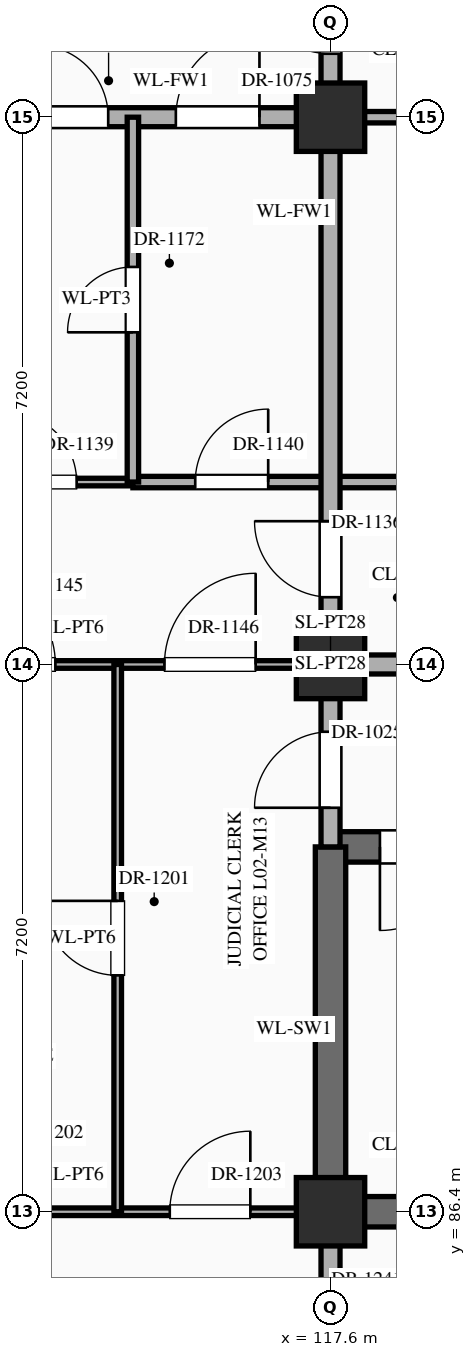
"""IFC4 building model, lengths in metres.
Left out: names, types, materials, properties, quantities, classifications, styles, units other than length and angle.
Written with IfcOpenShell. Run it as: python <this file> out.ifc"""

import sys

from ifc_helpers import new_model, si_unit, direction, frame, frame_2d, origin, origin_2d, place, context, subcontext, project, spatial, rectangle, extrude, element, fill, save


model = new_model("IFC4")
c1 = context("Model", 3, precision=1e-05, world=origin(), true_north=direction((0.0, 1.0)))
c2 = subcontext(c1, "Body", "Model", "MODEL_VIEW")
j1 = project(units=[si_unit("LENGTHUNIT", "METRE"), si_unit("PLANEANGLEUNIT", "RADIAN")], contexts=[c1])
p1 = place(None, origin())
s1 = spatial("IfcSite", under=j1, at=p1, CompositionType="ELEMENT")
p2 = place(p1, origin())
s2 = spatial("IfcBuilding", under=s1, at=p2, CompositionType="ELEMENT")
p3 = place(p2, frame((0.0, 0.0, 5.4)))
s3 = spatial("IfcBuildingStorey", under=s2, at=p3, CompositionType="ELEMENT", Elevation=5.4)
for number, where, z_axis, x_axis in (
    (1, (117.6, 86.4, 0.0), (0.0, 0.0, 1.0), (1.0, 0.0, 0.0)),
    (2, (117.6, 93.6, 0.0), (0.0, 0.0, 1.0), (1.0, 0.0, 0.0)),
    (3, (117.6, 100.8, 0.0), (0.0, 0.0, 1.0), (1.0, 0.0, 0.0)),
):
    element("IfcColumn", number, at=place(p3, frame(where, z_axis=z_axis, x_axis=x_axis)), inside=s3, PredefinedType="COLUMN", context=c2, shape_type="SweptSolid", body=[
        extrude(rectangle(XDim=0.9, YDim=0.9, at=origin_2d()), origin(), (0.0, 0.0, 1.0), 5.4),
    ])
p4 = place(p3, frame((109.2, 86.4, 0.0), z_axis=(0.0, 0.0, 1.0), x_axis=(1.0, 0.0, 0.0)))
e4 = element("IfcWall", 4, at=p4, inside=s3, PredefinedType="STANDARD", context=c2, shape_type="SweptSolid", body=[
    extrude(rectangle(XDim=8.4, YDim=0.1, at=frame_2d((4.2, 0.0))), origin(), (0.0, 0.0, 1.0), 4.27),
])
p5 = place(p4, frame((1.115, 0.0, 0.0)))
e5 = element("IfcOpeningElement", 5, at=p5, cuts=e4, PredefinedType="OPENING", context=c2, shape_type="SweptSolid", body=[
    extrude(rectangle(XDim=0.94, YDim=2.3, at=frame_2d((0.47, 1.15))), frame((0.0, 0.062, 0.0), z_axis=(0.0, -1.0, 0.0), x_axis=(1.0, 0.0, 0.0)), (0.0, 0.0, 1.0), 0.124),
])
p6 = place(p4, frame((3.69, 0.0, 0.0)))
e6 = element("IfcOpeningElement", 6, at=p6, cuts=e4, PredefinedType="OPENING", context=c2, shape_type="SweptSolid", body=[
    extrude(rectangle(XDim=1.02, YDim=2.4, at=frame_2d((0.51, 1.2))), frame((0.0, 0.062, 0.0), z_axis=(0.0, -1.0, 0.0), x_axis=(1.0, 0.0, 0.0)), (0.0, 0.0, 1.0), 0.124),
])
p7 = place(p4, frame((6.285, 0.0, 0.0)))
e7 = element("IfcOpeningElement", 7, at=p7, cuts=e4, PredefinedType="OPENING", context=c2, shape_type="SweptSolid", body=[
    extrude(rectangle(XDim=1.06, YDim=2.4, at=frame_2d((0.53, 1.2))), frame((0.0, 0.062, 0.0), z_axis=(0.0, -1.0, 0.0), x_axis=(1.0, 0.0, 0.0)), (0.0, 0.0, 1.0), 0.124),
])
p8 = place(p3, frame((117.6, 86.4, 0.0), z_axis=(0.0, 0.0, 1.0), x_axis=(1.0, 0.0, 0.0)))
e8 = element("IfcWall", 8, at=p8, inside=s3, PredefinedType="SHEAR", context=c2, shape_type="SweptSolid", body=[
    extrude(rectangle(XDim=8.4, YDim=0.4, at=frame_2d((4.2, 0.0))), origin(), (0.0, 0.0, 1.0), 5.12),
])
p9 = place(p3, frame((117.6, 91.2, 0.0), z_axis=(0.0, 0.0, 1.0), x_axis=(1.0, 0.0, 0.0)))
e9 = element("IfcWall", 9, at=p9, inside=s3, PredefinedType="SHEAR", context=c2, shape_type="SweptSolid", body=[
    extrude(rectangle(XDim=8.4, YDim=0.4, at=frame_2d((4.2, 0.0))), origin(), (0.0, 0.0, 1.0), 5.12),
])
p10 = place(p9, frame((0.65, 0.0, 0.0)))
e10 = element("IfcOpeningElement", 10, at=p10, cuts=e9, PredefinedType="OPENING", context=c2, shape_type="SweptSolid", body=[
    extrude(rectangle(XDim=1.1, YDim=2.2, at=frame_2d((0.55, 1.1))), frame((0.0, 0.212, 0.0), z_axis=(0.0, -1.0, 0.0), x_axis=(1.0, 0.0, 0.0)), (0.0, 0.0, 1.0), 0.424),
])
p11 = place(p3, frame((109.2, 93.6, 0.0), z_axis=(0.0, 0.0, 1.0), x_axis=(1.0, 0.0, 0.0)))
e11 = element("IfcWall", 11, at=p11, inside=s3, PredefinedType="STANDARD", context=c2, shape_type="SweptSolid", body=[
    extrude(rectangle(XDim=8.4, YDim=0.1, at=frame_2d((4.2, 0.0))), origin(), (0.0, 0.0, 1.0), 4.27),
])
p12 = place(p11, frame((1.025, 0.0, 0.0)))
e12 = element("IfcOpeningElement", 12, at=p12, cuts=e11, PredefinedType="OPENING", context=c2, shape_type="SweptSolid", body=[
    extrude(rectangle(XDim=1.12, YDim=2.25, at=frame_2d((0.56, 1.125))), frame((0.0, 0.062, 0.0), z_axis=(0.0, -1.0, 0.0), x_axis=(1.0, 0.0, 0.0)), (0.0, 0.0, 1.0), 0.124),
])
p13 = place(p11, frame((3.62, 0.0, 0.0)))
e13 = element("IfcOpeningElement", 13, at=p13, cuts=e11, PredefinedType="OPENING", context=c2, shape_type="SweptSolid", body=[
    extrude(rectangle(XDim=1.16, YDim=2.3, at=frame_2d((0.58, 1.15))), frame((0.0, 0.062, 0.0), z_axis=(0.0, -1.0, 0.0), x_axis=(1.0, 0.0, 0.0)), (0.0, 0.0, 1.0), 0.124),
])
p14 = place(p11, frame((6.215, 0.0, 0.0)))
e14 = element("IfcOpeningElement", 14, at=p14, cuts=e11, PredefinedType="OPENING", context=c2, shape_type="SweptSolid", body=[
    extrude(rectangle(XDim=1.2, YDim=2.35, at=frame_2d((0.6, 1.175))), frame((0.0, 0.062, 0.0), z_axis=(0.0, -1.0, 0.0), x_axis=(1.0, 0.0, 0.0)), (0.0, 0.0, 1.0), 0.124),
])
p15 = place(p3, frame((117.6, 93.6, 0.0), z_axis=(0.0, 0.0, 1.0), x_axis=(1.0, 0.0, 0.0)))
e15 = element("IfcWall", 15, at=p15, inside=s3, PredefinedType="STANDARD", context=c2, shape_type="SweptSolid", body=[
    extrude(rectangle(XDim=8.4, YDim=0.25, at=frame_2d((4.2, 0.0))), origin(), (0.0, 0.0, 1.0), 4.27),
])
p16 = place(p15, frame((3.462, 0.0, 0.0)))
e16 = element("IfcOpeningElement", 16, at=p16, cuts=e15, PredefinedType="OPENING", context=c2, shape_type="SweptSolid", body=[
    extrude(rectangle(XDim=1.5, YDim=2.25, at=frame_2d((0.75, 1.125))), frame((0.0, 0.137, 0.0), z_axis=(0.0, -1.0, 0.0), x_axis=(1.0, 0.0, 0.0)), (0.0, 0.0, 1.0), 0.274),
])
p17 = place(p3, frame((109.2, 96.0, 0.0), z_axis=(0.0, 0.0, 1.0), x_axis=(1.0, 0.0, 0.0)))
e17 = element("IfcWall", 17, at=p17, inside=s3, PredefinedType="STANDARD", context=c2, shape_type="SweptSolid", body=[
    extrude(rectangle(XDim=5.8, YDim=0.1, at=frame_2d((2.9, 0.0))), origin(), (0.0, 0.0, 1.0), 5.12),
])
p18 = place(p17, frame((1.27, 0.0, 0.0)))
e18 = element("IfcOpeningElement", 18, at=p18, cuts=e17, PredefinedType="OPENING", context=c2, shape_type="SweptSolid", body=[
    extrude(rectangle(XDim=0.86, YDim=2.1, at=frame_2d((0.43, 1.05))), frame((0.0, 0.062, 0.0), z_axis=(0.0, -1.0, 0.0), x_axis=(1.0, 0.0, 0.0)), (0.0, 0.0, 1.0), 0.124),
])
p19 = place(p17, frame((4.14, 0.0, 0.0)))
e19 = element("IfcOpeningElement", 19, at=p19, cuts=e17, PredefinedType="OPENING", context=c2, shape_type="SweptSolid", body=[
    extrude(rectangle(XDim=0.92, YDim=2.15, at=frame_2d((0.46, 1.075))), frame((0.0, 0.062, 0.0), z_axis=(0.0, -1.0, 0.0), x_axis=(1.0, 0.0, 0.0)), (0.0, 0.0, 1.0), 0.124),
])
p20 = place(p3, frame((115.0, 96.0, 0.0), z_axis=(0.0, 0.0, 1.0), x_axis=(1.0, 0.0, 0.0)))
e20 = element("IfcWall", 20, at=p20, inside=s3, PredefinedType="STANDARD", context=c2, shape_type="SweptSolid", body=[
    extrude(rectangle(XDim=19.4, YDim=0.15, at=frame_2d((9.7, 0.0))), origin(), (0.0, 0.0, 1.0), 5.12),
])
p21 = place(p20, frame((0.82, 0.0, 0.0)))
e21 = element("IfcOpeningElement", 21, at=p21, cuts=e20, PredefinedType="OPENING", context=c2, shape_type="SweptSolid", body=[
    extrude(rectangle(XDim=0.96, YDim=2.2, at=frame_2d((0.48, 1.1))), frame((0.0, 0.087, 0.0), z_axis=(0.0, -1.0, 0.0), x_axis=(1.0, 0.0, 0.0)), (0.0, 0.0, 1.0), 0.174),
])
p22 = place(p20, frame((6.18, 0.0, 0.0)))
e22 = element("IfcOpeningElement", 22, at=p22, cuts=e20, PredefinedType="OPENING", context=c2, shape_type="SweptSolid", body=[
    extrude(rectangle(XDim=1.24, YDim=2.3, at=frame_2d((0.62, 1.15))), frame((0.0, 0.087, 0.0), z_axis=(0.0, -1.0, 0.0), x_axis=(1.0, 0.0, 0.0)), (0.0, 0.0, 1.0), 0.174),
])
p23 = place(p20, frame((14.56, 0.0, 0.0)))
e23 = element("IfcOpeningElement", 23, at=p23, cuts=e20, PredefinedType="OPENING", context=c2, shape_type="SweptSolid", body=[
    extrude(rectangle(XDim=1.28, YDim=2.35, at=frame_2d((0.64, 1.175))), frame((0.0, 0.087, 0.0), z_axis=(0.0, -1.0, 0.0), x_axis=(1.0, 0.0, 0.0)), (0.0, 0.0, 1.0), 0.174),
])
p24 = place(p3, frame((113.4, 100.8, 0.0), z_axis=(0.0, 0.0, 1.0), x_axis=(1.0, 0.0, 0.0)))
e24 = element("IfcWall", 24, at=p24, inside=s3, PredefinedType="STANDARD", context=c2, shape_type="SweptSolid", body=[
    extrude(rectangle(XDim=4.2, YDim=0.25, at=frame_2d((2.1, 0.0))), origin(), (0.0, 0.0, 1.0), 4.27),
])
p25 = place(p24, frame((0.325, 0.0, 0.0)))
e25 = element("IfcOpeningElement", 25, at=p25, cuts=e24, PredefinedType="OPENING", context=c2, shape_type="SweptSolid", body=[
    extrude(rectangle(XDim=0.95, YDim=2.15, at=frame_2d((0.475, 1.075))), frame((0.0, 0.137, 0.0), z_axis=(0.0, -1.0, 0.0), x_axis=(1.0, 0.0, 0.0)), (0.0, 0.0, 1.0), 0.274),
])
p26 = place(p24, frame((2.165, 0.0, 0.0)))
e26 = element("IfcOpeningElement", 26, at=p26, cuts=e24, PredefinedType="OPENING", context=c2, shape_type="SweptSolid", body=[
    extrude(rectangle(XDim=1.1, YDim=2.2, at=frame_2d((0.55, 1.1))), frame((0.0, 0.137, 0.0), z_axis=(0.0, -1.0, 0.0), x_axis=(1.0, 0.0, 0.0)), (0.0, 0.0, 1.0), 0.274),
])
p27 = place(p3, frame((117.6, 100.8, 0.0), z_axis=(0.0, 0.0, 1.0), x_axis=(1.0, 0.0, 0.0)))
e27 = element("IfcWall", 27, at=p27, inside=s3, PredefinedType="STANDARD", context=c2, shape_type="SweptSolid", body=[
    extrude(rectangle(XDim=4.2, YDim=0.15, at=frame_2d((2.1, 0.0))), origin(), (0.0, 0.0, 1.0), 4.27),
])
p28 = place(p27, frame((1.805, 0.0, 0.0)))
e28 = element("IfcOpeningElement", 28, at=p28, cuts=e27, PredefinedType="OPENING", context=c2, shape_type="SweptSolid", body=[
    extrude(rectangle(XDim=0.96, YDim=2.2, at=frame_2d((0.48, 1.1))), frame((0.0, 0.087, 0.0), z_axis=(0.0, -1.0, 0.0), x_axis=(1.0, 0.0, 0.0)), (0.0, 0.0, 1.0), 0.174),
])
p29 = place(p3, frame((114.8, 86.4, 0.0), z_axis=(0.0, 0.0, 1.0), x_axis=(0.0, 1.0, 0.0)))
e29 = element("IfcWall", 29, at=p29, inside=s3, PredefinedType="STANDARD", context=c2, shape_type="SweptSolid", body=[
    extrude(rectangle(XDim=7.2, YDim=0.1, at=frame_2d((3.6, 0.0))), origin(), (0.0, 0.0, 1.0), 5.12),
])
p30 = place(p29, frame((3.11, 0.0, 0.0)))
e30 = element("IfcOpeningElement", 30, at=p30, cuts=e29, PredefinedType="OPENING", context=c2, shape_type="SweptSolid", body=[
    extrude(rectangle(XDim=0.98, YDim=2.35, at=frame_2d((0.49, 1.175))), frame((0.0, 0.062, 0.0), z_axis=(0.0, -1.0, 0.0), x_axis=(1.0, 0.0, 0.0)), (0.0, 0.0, 1.0), 0.124),
])
p31 = place(p3, frame((115.0, 96.0, 0.0), z_axis=(0.0, 0.0, 1.0), x_axis=(0.0, 1.0, 0.0)))
e31 = element("IfcWall", 31, at=p31, inside=s3, PredefinedType="STANDARD", context=c2, shape_type="SweptSolid", body=[
    extrude(rectangle(XDim=4.8, YDim=0.15, at=frame_2d((2.4, 0.0))), origin(), (0.0, 0.0, 1.0), 5.12),
])
p32 = place(p31, frame((1.97, 0.0, 0.0)))
e32 = element("IfcOpeningElement", 32, at=p32, cuts=e31, PredefinedType="OPENING", context=c2, shape_type="SweptSolid", body=[
    extrude(rectangle(XDim=0.86, YDim=2.1, at=frame_2d((0.43, 1.05))), frame((0.0, 0.087, 0.0), z_axis=(0.0, -1.0, 0.0), x_axis=(1.0, 0.0, 0.0)), (0.0, 0.0, 1.0), 0.174),
])
p33 = place(p3, frame((117.6, 79.24, 0.0), z_axis=(0.0, 0.0, 1.0), x_axis=(0.0, 1.0, 0.0)))
e33 = element("IfcWall", 33, at=p33, inside=s3, PredefinedType="STANDARD", context=c2, shape_type="SweptSolid", body=[
    extrude(rectangle(XDim=7.16, YDim=0.25, at=frame_2d((3.58, 0.0))), origin(), (0.0, 0.0, 1.0), 4.37),
])
p34 = place(p33, frame((5.275, 0.0, 0.0)))
e34 = element("IfcOpeningElement", 34, at=p34, cuts=e33, PredefinedType="OPENING", context=c2, shape_type="SweptSolid", body=[
    extrude(rectangle(XDim=1.0, YDim=2.2, at=frame_2d((0.5, 1.1))), frame((0.0, 0.137, 0.0), z_axis=(0.0, -1.0, 0.0), x_axis=(1.0, 0.0, 0.0)), (0.0, 0.0, 1.0), 0.274),
])
p35 = place(p3, frame((117.6, 86.4, 0.0), z_axis=(0.0, 0.0, 1.0), x_axis=(0.0, 1.0, 0.0)))
e35 = element("IfcWall", 35, at=p35, inside=s3, PredefinedType="SHEAR", context=c2, shape_type="SweptSolid", body=[
    extrude(rectangle(XDim=4.8, YDim=0.4, at=frame_2d((2.4, 0.0))), origin(), (0.0, 0.0, 1.0), 5.12),
])
p36 = place(p3, frame((117.6, 91.2, 0.0), z_axis=(0.0, 0.0, 1.0), x_axis=(0.0, 1.0, 0.0)))
e36 = element("IfcWall", 36, at=p36, inside=s3, PredefinedType="STANDARD", context=c2, shape_type="SweptSolid", body=[
    extrude(rectangle(XDim=13.2, YDim=0.25, at=frame_2d((6.6, 0.0))), origin(), (0.0, 0.0, 1.0), 4.37),
])
p37 = place(p36, frame((0.515, 0.0, 0.0)))
e37 = element("IfcOpeningElement", 37, at=p37, cuts=e36, PredefinedType="OPENING", context=c2, shape_type="SweptSolid", body=[
    extrude(rectangle(XDim=1.0, YDim=2.2, at=frame_2d((0.5, 1.1))), frame((0.0, 0.137, 0.0), z_axis=(0.0, -1.0, 0.0), x_axis=(1.0, 0.0, 0.0)), (0.0, 0.0, 1.0), 0.274),
])
p38 = place(p36, frame((10.435, 0.0, 0.0)))
e38 = element("IfcOpeningElement", 38, at=p38, cuts=e36, PredefinedType="OPENING", context=c2, shape_type="SweptSolid", body=[
    extrude(rectangle(XDim=1.1, YDim=2.2, at=frame_2d((0.55, 1.1))), frame((0.0, 0.137, 0.0), z_axis=(0.0, -1.0, 0.0), x_axis=(1.0, 0.0, 0.0)), (0.0, 0.0, 1.0), 0.274),
])
p39 = place(p36, frame((3.285, 0.0, 0.0)))
e39 = element("IfcOpeningElement", 39, at=p39, cuts=e36, PredefinedType="OPENING", context=c2, shape_type="SweptSolid", body=[
    extrude(rectangle(XDim=1.0, YDim=2.2, at=frame_2d((0.5, 1.1))), frame((0.0, 0.137, 0.0), z_axis=(0.0, -1.0, 0.0), x_axis=(1.0, 0.0, 0.0)), (0.0, 0.0, 1.0), 0.274),
])
p40 = place(p10, frame((1.1, 0.0, 0.0), z_axis=(0.0, 0.0, 1.0), x_axis=(-1.0, 0.0, 0.0)))
e40 = element("IfcDoor", 40, at=p40, inside=s3, OperationType="SINGLE_SWING_RIGHT", PredefinedType="DOOR", context=c2, shape_type="SweptSolid", body=[
    extrude(rectangle(XDim=1.1, YDim=2.2, at=frame_2d((0.55, 1.1))), frame((0.0, 0.025, 0.0), z_axis=(0.0, -1.0, 0.0), x_axis=(1.0, 0.0, 0.0)), (0.0, 0.0, 1.0), 0.05),
])
fill(e10, e40)
p41 = place(p37, origin())
e41 = element("IfcDoor", 41, at=p41, inside=s3, OperationType="SINGLE_SWING_LEFT", PredefinedType="DOOR", context=c2, shape_type="SweptSolid", body=[
    extrude(rectangle(XDim=1.0, YDim=2.2, at=frame_2d((0.5, 1.1))), frame((0.0, 0.025, 0.0), z_axis=(0.0, -1.0, 0.0), x_axis=(1.0, 0.0, 0.0)), (0.0, 0.0, 1.0), 0.05),
])
fill(e37, e41)
p42 = place(p38, origin())
e42 = element("IfcDoor", 42, at=p42, inside=s3, OperationType="SINGLE_SWING_RIGHT", PredefinedType="DOOR", context=c2, shape_type="SweptSolid", body=[
    extrude(rectangle(XDim=1.1, YDim=2.2, at=frame_2d((0.55, 1.1))), frame((0.0, 0.025, 0.0), z_axis=(0.0, -1.0, 0.0), x_axis=(1.0, 0.0, 0.0)), (0.0, 0.0, 1.0), 0.05),
])
fill(e38, e42)
p43 = place(p25, origin())
e43 = element("IfcDoor", 43, at=p43, inside=s3, OperationType="SINGLE_SWING_LEFT", PredefinedType="DOOR", context=c2, shape_type="SweptSolid", body=[
    extrude(rectangle(XDim=0.95, YDim=2.15, at=frame_2d((0.475, 1.075))), frame((0.0, 0.025, 0.0), z_axis=(0.0, -1.0, 0.0), x_axis=(1.0, 0.0, 0.0)), (0.0, 0.0, 1.0), 0.05),
])
fill(e25, e43)
p44 = place(p26, origin())
e44 = element("IfcDoor", 44, at=p44, inside=s3, OperationType="SINGLE_SWING_RIGHT", PredefinedType="DOOR", context=c2, shape_type="SweptSolid", body=[
    extrude(rectangle(XDim=1.1, YDim=2.2, at=frame_2d((0.55, 1.1))), frame((0.0, 0.025, 0.0), z_axis=(0.0, -1.0, 0.0), x_axis=(1.0, 0.0, 0.0)), (0.0, 0.0, 1.0), 0.05),
])
fill(e26, e44)
p45 = place(p39, origin())
e45 = element("IfcDoor", 45, at=p45, inside=s3, OperationType="SINGLE_SWING_RIGHT", PredefinedType="DOOR", context=c2, shape_type="SweptSolid", body=[
    extrude(rectangle(XDim=1.0, YDim=2.2, at=frame_2d((0.5, 1.1))), frame((0.0, 0.025, 0.0), z_axis=(0.0, -1.0, 0.0), x_axis=(1.0, 0.0, 0.0)), (0.0, 0.0, 1.0), 0.05),
])
fill(e39, e45)
p46 = place(p19, origin())
e46 = element("IfcDoor", 46, at=p46, inside=s3, OperationType="SINGLE_SWING_LEFT", PredefinedType="DOOR", context=c2, shape_type="SweptSolid", body=[
    extrude(rectangle(XDim=0.92, YDim=2.15, at=frame_2d((0.46, 1.075))), frame((0.0, 0.025, 0.0), z_axis=(0.0, -1.0, 0.0), x_axis=(1.0, 0.0, 0.0)), (0.0, 0.0, 1.0), 0.05),
])
fill(e19, e46)
p47 = place(p21, origin())
e47 = element("IfcDoor", 47, at=p47, inside=s3, OperationType="SINGLE_SWING_RIGHT", PredefinedType="DOOR", context=c2, shape_type="SweptSolid", body=[
    extrude(rectangle(XDim=0.96, YDim=2.2, at=frame_2d((0.48, 1.1))), frame((0.0, 0.025, 0.0), z_axis=(0.0, -1.0, 0.0), x_axis=(1.0, 0.0, 0.0)), (0.0, 0.0, 1.0), 0.05),
])
fill(e21, e47)
p48 = place(p13, origin())
e48 = element("IfcDoor", 48, at=p48, inside=s3, OperationType="SINGLE_SWING_LEFT", PredefinedType="DOOR", context=c2, shape_type="SweptSolid", body=[
    extrude(rectangle(XDim=1.16, YDim=2.3, at=frame_2d((0.58, 1.15))), frame((0.0, 0.025, 0.0), z_axis=(0.0, -1.0, 0.0), x_axis=(1.0, 0.0, 0.0)), (0.0, 0.0, 1.0), 0.05),
])
fill(e13, e48)
p49 = place(p14, origin())
e49 = element("IfcDoor", 49, at=p49, inside=s3, OperationType="SINGLE_SWING_RIGHT", PredefinedType="DOOR", context=c2, shape_type="SweptSolid", body=[
    extrude(rectangle(XDim=1.2, YDim=2.35, at=frame_2d((0.6, 1.175))), frame((0.0, 0.025, 0.0), z_axis=(0.0, -1.0, 0.0), x_axis=(1.0, 0.0, 0.0)), (0.0, 0.0, 1.0), 0.05),
])
fill(e14, e49)
p50 = place(p32, origin())
e50 = element("IfcDoor", 50, at=p50, inside=s3, OperationType="SINGLE_SWING_LEFT", PredefinedType="DOOR", context=c2, shape_type="SweptSolid", body=[
    extrude(rectangle(XDim=0.86, YDim=2.1, at=frame_2d((0.43, 1.05))), frame((0.0, 0.025, 0.0), z_axis=(0.0, -1.0, 0.0), x_axis=(1.0, 0.0, 0.0)), (0.0, 0.0, 1.0), 0.05),
])
fill(e32, e50)
p51 = place(p30, origin())
e51 = element("IfcDoor", 51, at=p51, inside=s3, OperationType="SINGLE_SWING_RIGHT", PredefinedType="DOOR", context=c2, shape_type="SweptSolid", body=[
    extrude(rectangle(XDim=0.98, YDim=2.35, at=frame_2d((0.49, 1.175))), frame((0.0, 0.025, 0.0), z_axis=(0.0, -1.0, 0.0), x_axis=(1.0, 0.0, 0.0)), (0.0, 0.0, 1.0), 0.05),
])
fill(e30, e51)
p52 = place(p7, origin())
e52 = element("IfcDoor", 52, at=p52, inside=s3, OperationType="SINGLE_SWING_RIGHT", PredefinedType="DOOR", context=c2, shape_type="SweptSolid", body=[
    extrude(rectangle(XDim=1.06, YDim=2.4, at=frame_2d((0.53, 1.2))), frame((0.0, 0.025, 0.0), z_axis=(0.0, -1.0, 0.0), x_axis=(1.0, 0.0, 0.0)), (0.0, 0.0, 1.0), 0.05),
])
fill(e7, e52)
save(model, sys.argv[1])
